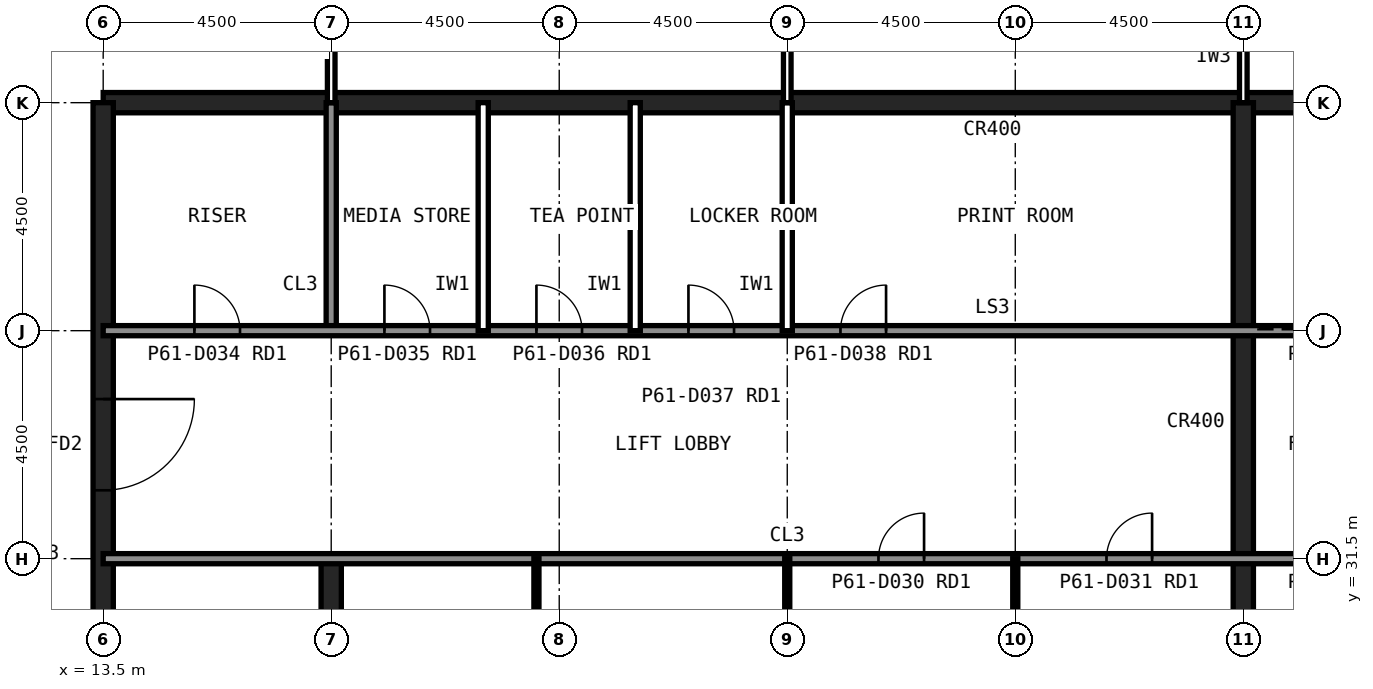
"""IFC4 building model, lengths in metres.
Left out: names, types, materials, properties, quantities, classifications, styles, units other than length and angle.
Written with IfcOpenShell. Run it as: python <this file> out.ifc"""

import sys

from ifc_helpers import new_model, si_unit, direction, frame, frame_2d, origin, place, context, subcontext, project, spatial, rectangle, extrude, element, fill, save


model = new_model("IFC4")
c1 = context("Model", 3, precision=1e-05, world=origin(), true_north=direction((0.0, 1.0)))
c2 = subcontext(c1, "Body", "Model", "MODEL_VIEW")
j1 = project(units=[si_unit("LENGTHUNIT", "METRE"), si_unit("PLANEANGLEUNIT", "RADIAN")], contexts=[c1])
p1 = place(None, origin())
s1 = spatial("IfcSite", under=j1, at=p1, CompositionType="ELEMENT")
p2 = place(p1, origin())
s2 = spatial("IfcBuilding", under=s1, at=p2, CompositionType="ELEMENT")
p3 = place(p2, frame((0.0, 0.0, 254.6)))
s3 = spatial("IfcBuildingStorey", under=s2, at=p3, CompositionType="ELEMENT", Elevation=254.6)
p4 = place(p3, frame((40.5, 40.5, 0.0), z_axis=(0.0, 0.0, 1.0), x_axis=(-1.0, 0.0, 0.0)))
e1 = element("IfcWall", 1, at=p4, inside=s3, PredefinedType="SHEAR", context=c2, shape_type="SweptSolid", body=[
    extrude(rectangle(XDim=27.0, YDim=0.4, at=frame_2d((13.5, 0.0))), origin(), (0.0, 0.0, 1.0), 4.0),
])
p5 = place(p3, frame((13.5, 40.5, 0.0), z_axis=(0.0, 0.0, 1.0), x_axis=(0.0, -1.0, 0.0)))
e2 = element("IfcWall", 2, at=p5, inside=s3, PredefinedType="SHEAR", context=c2, shape_type="SweptSolid", body=[
    extrude(rectangle(XDim=27.0, YDim=0.4, at=frame_2d((13.5, 0.0))), origin(), (0.0, 0.0, 1.0), 4.0),
])
p6 = place(p5, frame((19.65, 0.0, 0.0)))
e3 = element("IfcOpeningElement", 3, at=p6, cuts=e2, PredefinedType="OPENING", context=c2, shape_type="SweptSolid", body=[
    extrude(rectangle(XDim=1.2, YDim=2.1, at=frame_2d((0.6, 1.05))), frame((0.0, 0.21, 0.0), z_axis=(0.0, -1.0, 0.0), x_axis=(1.0, 0.0, 0.0)), (0.0, 0.0, 1.0), 0.42),
])
p7 = place(p5, frame((5.85, 0.0, 0.0)))
e4 = element("IfcOpeningElement", 4, at=p7, cuts=e2, PredefinedType="OPENING", context=c2, shape_type="SweptSolid", body=[
    extrude(rectangle(XDim=1.8, YDim=2.1, at=frame_2d((0.9, 1.05))), frame((0.0, 0.21, 0.0), z_axis=(0.0, -1.0, 0.0), x_axis=(1.0, 0.0, 0.0)), (0.0, 0.0, 1.0), 0.42),
])
p8 = place(p3, frame((18.0, 13.5, 0.0), z_axis=(0.0, 0.0, 1.0), x_axis=(0.0, 1.0, 0.0)))
e5 = element("IfcWall", 5, at=p8, inside=s3, PredefinedType="SHEAR", context=c2, shape_type="SweptSolid", body=[
    extrude(rectangle(XDim=18.0, YDim=0.4, at=frame_2d((9.0, 0.0))), origin(), (0.0, 0.0, 1.0), 4.0),
])
p9 = place(p3, frame((18.0, 36.0, 0.0), z_axis=(0.0, 0.0, 1.0), x_axis=(0.0, 1.0, 0.0)))
e6 = element("IfcWall", 6, at=p9, inside=s3, PredefinedType="SOLIDWALL", context=c2, shape_type="SweptSolid", body=[
    extrude(rectangle(XDim=4.5, YDim=0.2, at=frame_2d((2.25, 0.0))), origin(), (0.0, 0.0, 1.0), 3.84),
])
p10 = place(p3, frame((36.0, 22.5, 0.0), z_axis=(0.0, 0.0, 1.0), x_axis=(0.0, 1.0, 0.0)))
e7 = element("IfcWall", 7, at=p10, inside=s3, PredefinedType="SHEAR", context=c2, shape_type="SweptSolid", body=[
    extrude(rectangle(XDim=18.0, YDim=0.4, at=frame_2d((9.0, 0.0))), origin(), (0.0, 0.0, 1.0), 4.0),
])
p11 = place(p3, frame((13.5, 36.0, 0.0), z_axis=(0.0, 0.0, 1.0), x_axis=(1.0, 0.0, 0.0)))
e8 = element("IfcWall", 8, at=p11, inside=s3, PredefinedType="SOLIDWALL", context=c2, shape_type="SweptSolid", body=[
    extrude(rectangle(XDim=27.0, YDim=0.2, at=frame_2d((13.5, 0.0))), origin(), (0.0, 0.0, 1.0), 3.84),
])
p12 = place(p11, frame((1.8, 0.0, 0.0)))
e9 = element("IfcOpeningElement", 9, at=p12, cuts=e8, PredefinedType="OPENING", context=c2, shape_type="SweptSolid", body=[
    extrude(rectangle(XDim=0.9, YDim=2.1, at=frame_2d((0.45, 1.05))), frame((0.0, 0.11, 0.0), z_axis=(0.0, -1.0, 0.0), x_axis=(1.0, 0.0, 0.0)), (0.0, 0.0, 1.0), 0.22),
])
p13 = place(p11, frame((5.55, 0.0, 0.0)))
e10 = element("IfcOpeningElement", 10, at=p13, cuts=e8, PredefinedType="OPENING", context=c2, shape_type="SweptSolid", body=[
    extrude(rectangle(XDim=0.9, YDim=2.1, at=frame_2d((0.45, 1.05))), frame((0.0, 0.11, 0.0), z_axis=(0.0, -1.0, 0.0), x_axis=(1.0, 0.0, 0.0)), (0.0, 0.0, 1.0), 0.22),
])
p14 = place(p11, frame((14.55, 0.0, 0.0)))
e11 = element("IfcOpeningElement", 11, at=p14, cuts=e8, PredefinedType="OPENING", context=c2, shape_type="SweptSolid", body=[
    extrude(rectangle(XDim=0.9, YDim=2.1, at=frame_2d((0.45, 1.05))), frame((0.0, 0.11, 0.0), z_axis=(0.0, -1.0, 0.0), x_axis=(1.0, 0.0, 0.0)), (0.0, 0.0, 1.0), 0.22),
])
p15 = place(p11, frame((17.55, 0.0, 0.0)))
e12 = element("IfcOpeningElement", 12, at=p15, cuts=e8, PredefinedType="OPENING", context=c2, shape_type="SweptSolid", body=[
    extrude(rectangle(XDim=0.9, YDim=2.1, at=frame_2d((0.45, 1.05))), frame((0.0, 0.11, 0.0), z_axis=(0.0, -1.0, 0.0), x_axis=(1.0, 0.0, 0.0)), (0.0, 0.0, 1.0), 0.22),
])
p16 = place(p11, frame((24.1, 0.0, 0.0)))
e13 = element("IfcOpeningElement", 13, at=p16, cuts=e8, PredefinedType="OPENING", context=c2, shape_type="SweptSolid", body=[
    extrude(rectangle(XDim=1.3, YDim=2.2, at=frame_2d((0.65, 1.1))), frame((0.0, 0.11, 0.0), z_axis=(0.0, -1.0, 0.0), x_axis=(1.0, 0.0, 0.0)), (0.0, 0.0, 1.0), 0.22),
])
p17 = place(p3, frame((13.5, 31.5, 0.0), z_axis=(0.0, 0.0, 1.0), x_axis=(1.0, 0.0, 0.0)))
e14 = element("IfcWall", 14, at=p17, inside=s3, PredefinedType="SOLIDWALL", context=c2, shape_type="SweptSolid", body=[
    extrude(rectangle(XDim=27.0, YDim=0.2, at=frame_2d((13.5, 0.0))), origin(), (0.0, 0.0, 1.0), 3.84),
])
p18 = place(p17, frame((24.15, 0.0, 0.0)))
e15 = element("IfcOpeningElement", 15, at=p18, cuts=e14, PredefinedType="OPENING", context=c2, shape_type="SweptSolid", body=[
    extrude(rectangle(XDim=1.2, YDim=2.1, at=frame_2d((0.6, 1.05))), frame((0.0, 0.11, 0.0), z_axis=(0.0, -1.0, 0.0), x_axis=(1.0, 0.0, 0.0)), (0.0, 0.0, 1.0), 0.22),
])
p19 = place(p17, frame((15.3, 0.0, 0.0)))
e16 = element("IfcOpeningElement", 16, at=p19, cuts=e14, PredefinedType="OPENING", context=c2, shape_type="SweptSolid", body=[
    extrude(rectangle(XDim=0.9, YDim=2.1, at=frame_2d((0.45, 1.05))), frame((0.0, 0.11, 0.0), z_axis=(0.0, -1.0, 0.0), x_axis=(1.0, 0.0, 0.0)), (0.0, 0.0, 1.0), 0.22),
])
p20 = place(p17, frame((19.8, 0.0, 0.0)))
e17 = element("IfcOpeningElement", 17, at=p20, cuts=e14, PredefinedType="OPENING", context=c2, shape_type="SweptSolid", body=[
    extrude(rectangle(XDim=0.9, YDim=2.1, at=frame_2d((0.45, 1.05))), frame((0.0, 0.11, 0.0), z_axis=(0.0, -1.0, 0.0), x_axis=(1.0, 0.0, 0.0)), (0.0, 0.0, 1.0), 0.22),
])
for number, where, z_axis, x_axis in (
    (18, (27.0, 36.0, 0.0), (0.0, 0.0, 1.0), (0.0, 1.0, 0.0)),
    (19, (30.0, 36.0, 0.0), (0.0, 0.0, 1.0), (0.0, 1.0, 0.0)),
):
    element("IfcWall", number, at=place(p3, frame(where, z_axis=z_axis, x_axis=x_axis)), inside=s3, PredefinedType="PARTITIONING", context=c2, shape_type="SweptSolid", body=[
        extrude(rectangle(XDim=4.5, YDim=0.2, at=frame_2d((2.25, 0.0))), origin(), (0.0, 0.0, 1.0), 3.84),
    ])
for number, where, z_axis, x_axis in (
    (20, (22.05, 22.5, 0.0), (0.0, 0.0, 1.0), (0.0, 1.0, 0.0)),
    (21, (27.0, 22.5, 0.0), (0.0, 0.0, 1.0), (0.0, 1.0, 0.0)),
    (22, (31.5, 22.5, 0.0), (0.0, 0.0, 1.0), (0.0, 1.0, 0.0)),
):
    element("IfcWall", number, at=place(p3, frame(where, z_axis=z_axis, x_axis=x_axis)), inside=s3, PredefinedType="PLUMBINGWALL", context=c2, shape_type="SweptSolid", body=[
        extrude(rectangle(XDim=9.0, YDim=0.1, at=frame_2d((4.5, 0.0))), origin(), (0.0, 0.0, 1.0), 3.84),
    ])
p21 = place(p3, frame((27.0, 40.5, 0.0), z_axis=(0.0, 0.0, 1.0), x_axis=(0.0, 1.0, 0.0)))
e23 = element("IfcWall", 23, at=p21, inside=s3, PredefinedType="PARTITIONING", context=c2, shape_type="SweptSolid", body=[
    extrude(rectangle(XDim=6.75, YDim=0.15, at=frame_2d((3.375, 0.0))), origin(), (0.0, 0.0, 1.0), 2.989),
])
p22 = place(p3, frame((18.0, 47.25, 0.0), z_axis=(0.0, 0.0, 1.0), x_axis=(0.0, -1.0, 0.0)))
e24 = element("IfcWall", 24, at=p22, inside=s3, PredefinedType="PARTITIONING", context=c2, shape_type="SweptSolid", body=[
    extrude(rectangle(XDim=6.75, YDim=0.15, at=frame_2d((3.375, 0.0))), origin(), (0.0, 0.0, 1.0), 2.989),
])
p23 = place(p22, frame((2.875, 0.0, 0.0)))
e25 = element("IfcOpeningElement", 25, at=p23, cuts=e24, PredefinedType="OPENING", context=c2, shape_type="SweptSolid", body=[
    extrude(rectangle(XDim=1.0, YDim=2.1, at=frame_2d((0.5, 1.05))), frame((0.0, 0.085, 0.0), z_axis=(0.0, -1.0, 0.0), x_axis=(1.0, 0.0, 0.0)), (0.0, 0.0, 1.0), 0.17),
])
p24 = place(p3, frame((36.0, 40.5, 0.0), z_axis=(0.0, 0.0, 1.0), x_axis=(0.0, 1.0, 0.0)))
e26 = element("IfcWall", 26, at=p24, inside=s3, PredefinedType="PARTITIONING", context=c2, shape_type="SweptSolid", body=[
    extrude(rectangle(XDim=4.5, YDim=0.15, at=frame_2d((2.25, 0.0))), origin(), (0.0, 0.0, 1.0), 2.989),
])
p25 = place(p24, frame((1.75, 0.0, 0.0)))
e27 = element("IfcOpeningElement", 27, at=p25, cuts=e26, PredefinedType="OPENING", context=c2, shape_type="SweptSolid", body=[
    extrude(rectangle(XDim=1.0, YDim=2.1, at=frame_2d((0.5, 1.05))), frame((0.0, 0.085, 0.0), z_axis=(0.0, -1.0, 0.0), x_axis=(1.0, 0.0, 0.0)), (0.0, 0.0, 1.0), 0.17),
])
p26 = place(p7, origin())
e28 = element("IfcDoor", 28, at=p26, inside=s3, OperationType="SINGLE_SWING_LEFT", PredefinedType="DOOR", context=c2, shape_type="SweptSolid", body=[
    extrude(rectangle(XDim=1.8, YDim=2.1, at=frame_2d((0.9, 1.05))), frame((0.0, 0.025, 0.0), z_axis=(0.0, -1.0, 0.0), x_axis=(1.0, 0.0, 0.0)), (0.0, 0.0, 1.0), 0.05),
])
fill(e4, e28)
p27 = place(p19, origin())
e29 = element("IfcDoor", 29, at=p27, inside=s3, OperationType="SINGLE_SWING_RIGHT", PredefinedType="DOOR", context=c2, shape_type="SweptSolid", body=[
    extrude(rectangle(XDim=0.9, YDim=2.1, at=frame_2d((0.45, 1.05))), frame((0.0, 0.025, 0.0), z_axis=(0.0, -1.0, 0.0), x_axis=(1.0, 0.0, 0.0)), (0.0, 0.0, 1.0), 0.05),
])
fill(e16, e29)
p28 = place(p20, origin())
e30 = element("IfcDoor", 30, at=p28, inside=s3, OperationType="SINGLE_SWING_RIGHT", PredefinedType="DOOR", context=c2, shape_type="SweptSolid", body=[
    extrude(rectangle(XDim=0.9, YDim=2.1, at=frame_2d((0.45, 1.05))), frame((0.0, 0.025, 0.0), z_axis=(0.0, -1.0, 0.0), x_axis=(1.0, 0.0, 0.0)), (0.0, 0.0, 1.0), 0.05),
])
fill(e17, e30)
p29 = place(p12, origin())
e31 = element("IfcDoor", 31, at=p29, inside=s3, OperationType="SINGLE_SWING_LEFT", PredefinedType="DOOR", context=c2, shape_type="SweptSolid", body=[
    extrude(rectangle(XDim=0.9, YDim=2.1, at=frame_2d((0.45, 1.05))), frame((0.0, 0.025, 0.0), z_axis=(0.0, -1.0, 0.0), x_axis=(1.0, 0.0, 0.0)), (0.0, 0.0, 1.0), 0.05),
])
fill(e9, e31)
p30 = place(p13, origin())
e32 = element("IfcDoor", 32, at=p30, inside=s3, OperationType="SINGLE_SWING_LEFT", PredefinedType="DOOR", context=c2, shape_type="SweptSolid", body=[
    extrude(rectangle(XDim=0.9, YDim=2.1, at=frame_2d((0.45, 1.05))), frame((0.0, 0.025, 0.0), z_axis=(0.0, -1.0, 0.0), x_axis=(1.0, 0.0, 0.0)), (0.0, 0.0, 1.0), 0.05),
])
fill(e10, e32)
p31 = place(p14, origin())
e33 = element("IfcDoor", 33, at=p31, inside=s3, OperationType="SINGLE_SWING_RIGHT", PredefinedType="DOOR", context=c2, shape_type="SweptSolid", body=[
    extrude(rectangle(XDim=0.9, YDim=2.1, at=frame_2d((0.45, 1.05))), frame((0.0, 0.025, 0.0), z_axis=(0.0, -1.0, 0.0), x_axis=(1.0, 0.0, 0.0)), (0.0, 0.0, 1.0), 0.05),
])
fill(e11, e33)
p32 = place(p15, origin())
e34 = element("IfcDoor", 34, at=p32, inside=s3, OperationType="SINGLE_SWING_RIGHT", PredefinedType="DOOR", context=c2, shape_type="SweptSolid", body=[
    extrude(rectangle(XDim=0.9, YDim=2.1, at=frame_2d((0.45, 1.05))), frame((0.0, 0.025, 0.0), z_axis=(0.0, -1.0, 0.0), x_axis=(1.0, 0.0, 0.0)), (0.0, 0.0, 1.0), 0.05),
])
fill(e12, e34)
save(model, sys.argv[1])
